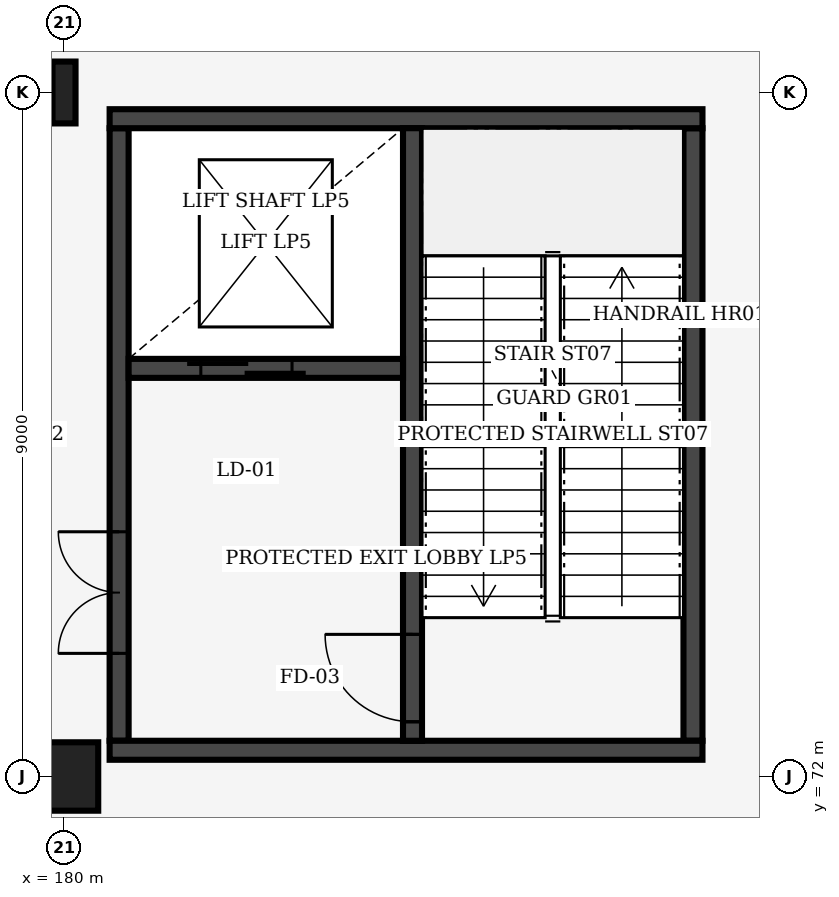
"""IFC4 building model, lengths in metres.
Left out: names, types, materials, properties, quantities, classifications, styles, units other than length and angle.
Written with IfcOpenShell. Run it as: python <this file> out.ifc"""

import sys

from ifc_helpers import new_model, si_unit, direction, frame, frame_2d, origin, origin_2d, place, context, subcontext, project, spatial, rectangle, i_section, extrude, element, fill, save


model = new_model("IFC4")
c1 = context("Model", 3, precision=1e-05, world=origin(), true_north=direction((0.0, 1.0)))
c2 = subcontext(c1, "Body", "Model", "MODEL_VIEW")
j1 = project(units=[si_unit("LENGTHUNIT", "METRE"), si_unit("PLANEANGLEUNIT", "RADIAN")], contexts=[c1])
p1 = place(None, origin())
s1 = spatial("IfcSite", under=j1, at=p1, CompositionType="ELEMENT")
p2 = place(p1, origin())
s2 = spatial("IfcBuilding", under=s1, at=p2, CompositionType="ELEMENT")
p3 = place(p2, origin())
s3 = spatial("IfcBuildingStorey", under=s2, at=p3, CompositionType="ELEMENT", Elevation=0.0)
p4 = place(p3, frame((180.0, 72.0, 0.0), z_axis=(0.0, 0.0, 1.0), x_axis=(1.0, 0.0, 0.0)))
e1 = element("IfcColumn", 1, at=p4, inside=s3, PredefinedType="COLUMN", context=c2, shape_type="SweptSolid", body=[
    extrude(rectangle(XDim=0.9, YDim=0.9, at=origin_2d()), origin(), (0.0, 0.0, 1.0), 6.0),
])
p5 = place(p3, frame((180.0, 81.0, 0.0), z_axis=(0.0, 0.0, 1.0), x_axis=(1.0, 0.0, 0.0)))
e2 = element("IfcColumn", 2, at=p5, inside=s3, PredefinedType="COLUMN", context=c2, shape_type="SweptSolid", body=[
    extrude(i_section(OverallWidth=0.303, OverallDepth=0.814, WebThickness=0.021, FlangeThickness=0.04, FilletRadius=0.03, at=origin_2d()), origin(), (0.0, 0.0, 1.0), 6.0),
])
p6 = place(p3, frame((180.725, 72.47, 0.0), z_axis=(0.0, 0.0, 1.0), x_axis=(0.0, 1.0, 0.0)))
e3 = element("IfcWall", 3, at=p6, inside=s3, PredefinedType="SHEAR", context=c2, shape_type="SweptSolid", body=[
    extrude(rectangle(XDim=8.06, YDim=0.25, at=frame_2d((4.03, 0.0))), origin(), (0.0, 0.0, 1.0), 5.64),
])
p7 = place(p6, frame((1.15, 0.0, 0.0)))
e4 = element("IfcOpeningElement", 4, at=p7, cuts=e3, PredefinedType="OPENING", context=c2, shape_type="SweptSolid", body=[
    extrude(rectangle(XDim=1.6, YDim=2.2, at=frame_2d((0.8, 1.1))), frame((0.0, 0.135, 0.0), z_axis=(0.0, -1.0, 0.0), x_axis=(1.0, 0.0, 0.0)), (0.0, 0.0, 1.0), 0.27),
])
p8 = place(p3, frame((188.275, 72.47, 0.0), z_axis=(0.0, 0.0, 1.0), x_axis=(0.0, 1.0, 0.0)))
e5 = element("IfcWall", 5, at=p8, inside=s3, PredefinedType="SHEAR", context=c2, shape_type="SweptSolid", body=[
    extrude(rectangle(XDim=8.06, YDim=0.25, at=frame_2d((4.03, 0.0))), origin(), (0.0, 0.0, 1.0), 5.64),
])
for number, where, z_axis, x_axis in (
    (6, (180.6, 72.345, 0.0), (0.0, 0.0, 1.0), (1.0, 0.0, 0.0)),
    (7, (180.6, 80.655, 0.0), (0.0, 0.0, 1.0), (1.0, 0.0, 0.0)),
):
    element("IfcWall", number, at=place(p3, frame(where, z_axis=z_axis, x_axis=x_axis)), inside=s3, PredefinedType="SHEAR", context=c2, shape_type="SweptSolid", body=[
        extrude(rectangle(XDim=7.8, YDim=0.25, at=frame_2d((3.9, 0.0))), origin(), (0.0, 0.0, 1.0), 5.64),
    ])
p9 = place(p3, frame((184.585, 72.47, 0.0), z_axis=(0.0, 0.0, 1.0), x_axis=(0.0, 1.0, 0.0)))
e8 = element("IfcWall", 8, at=p9, inside=s3, PredefinedType="SHEAR", context=c2, shape_type="SweptSolid", body=[
    extrude(rectangle(XDim=8.06, YDim=0.25, at=frame_2d((4.03, 0.0))), origin(), (0.0, 0.0, 1.0), 5.64),
])
p10 = place(p9, frame((0.25, 0.0, 0.0)))
e9 = element("IfcOpeningElement", 9, at=p10, cuts=e8, PredefinedType="OPENING", context=c2, shape_type="SweptSolid", body=[
    extrude(rectangle(XDim=1.15, YDim=2.15, at=frame_2d((0.575, 1.075))), frame((0.0, 0.135, 0.0), z_axis=(0.0, -1.0, 0.0), x_axis=(1.0, 0.0, 0.0)), (0.0, 0.0, 1.0), 0.27),
])
p11 = place(p3, frame((180.85, 77.37, 0.0), z_axis=(0.0, 0.0, 1.0), x_axis=(1.0, 0.0, 0.0)))
e10 = element("IfcWall", 10, at=p11, inside=s3, PredefinedType="SHEAR", context=c2, shape_type="SweptSolid", body=[
    extrude(rectangle(XDim=3.61, YDim=0.25, at=frame_2d((1.805, 0.0))), origin(), (0.0, 0.0, 1.0), 5.64),
])
p12 = place(p11, frame((0.95, 0.0, 0.0)))
e11 = element("IfcOpeningElement", 11, at=p12, cuts=e10, PredefinedType="OPENING", context=c2, shape_type="SweptSolid", body=[
    extrude(rectangle(XDim=1.2, YDim=2.2, at=frame_2d((0.6, 1.1))), frame((0.0, 0.135, 0.0), z_axis=(0.0, -1.0, 0.0), x_axis=(1.0, 0.0, 0.0)), (0.0, 0.0, 1.0), 0.27),
])
p13 = place(p10, origin())
e12 = element("IfcDoor", 12, at=p13, inside=s3, OperationType="SINGLE_SWING_RIGHT", PredefinedType="DOOR", context=c2, shape_type="SweptSolid", body=[
    extrude(rectangle(XDim=1.15, YDim=2.15, at=frame_2d((0.575, 1.075))), frame((0.0, 0.025, 0.0), z_axis=(0.0, -1.0, 0.0), x_axis=(1.0, 0.0, 0.0)), (0.0, 0.0, 1.0), 0.05),
])
fill(e9, e12)
p14 = place(p12, origin())
e13 = element("IfcDoor", 13, at=p14, inside=s3, OperationType="DOUBLE_DOOR_SLIDING", PredefinedType="DOOR", context=c2, shape_type="SweptSolid", body=[
    extrude(rectangle(XDim=1.2, YDim=2.2, at=frame_2d((0.6, 1.1))), frame((0.0, 0.025, 0.0), z_axis=(0.0, -1.0, 0.0), x_axis=(1.0, 0.0, 0.0)), (0.0, 0.0, 1.0), 0.05),
])
fill(e11, e13)
p15 = place(p7, origin())
e14 = element("IfcDoor", 14, at=p15, inside=s3, OperationType="DOUBLE_DOOR_SINGLE_SWING", PredefinedType="DOOR", context=c2, shape_type="SweptSolid", body=[
    extrude(rectangle(XDim=1.6, YDim=2.2, at=frame_2d((0.8, 1.1))), frame((0.0, 0.025, 0.0), z_axis=(0.0, -1.0, 0.0), x_axis=(1.0, 0.0, 0.0)), (0.0, 0.0, 1.0), 0.05),
])
fill(e4, e14)
save(model, sys.argv[1])
